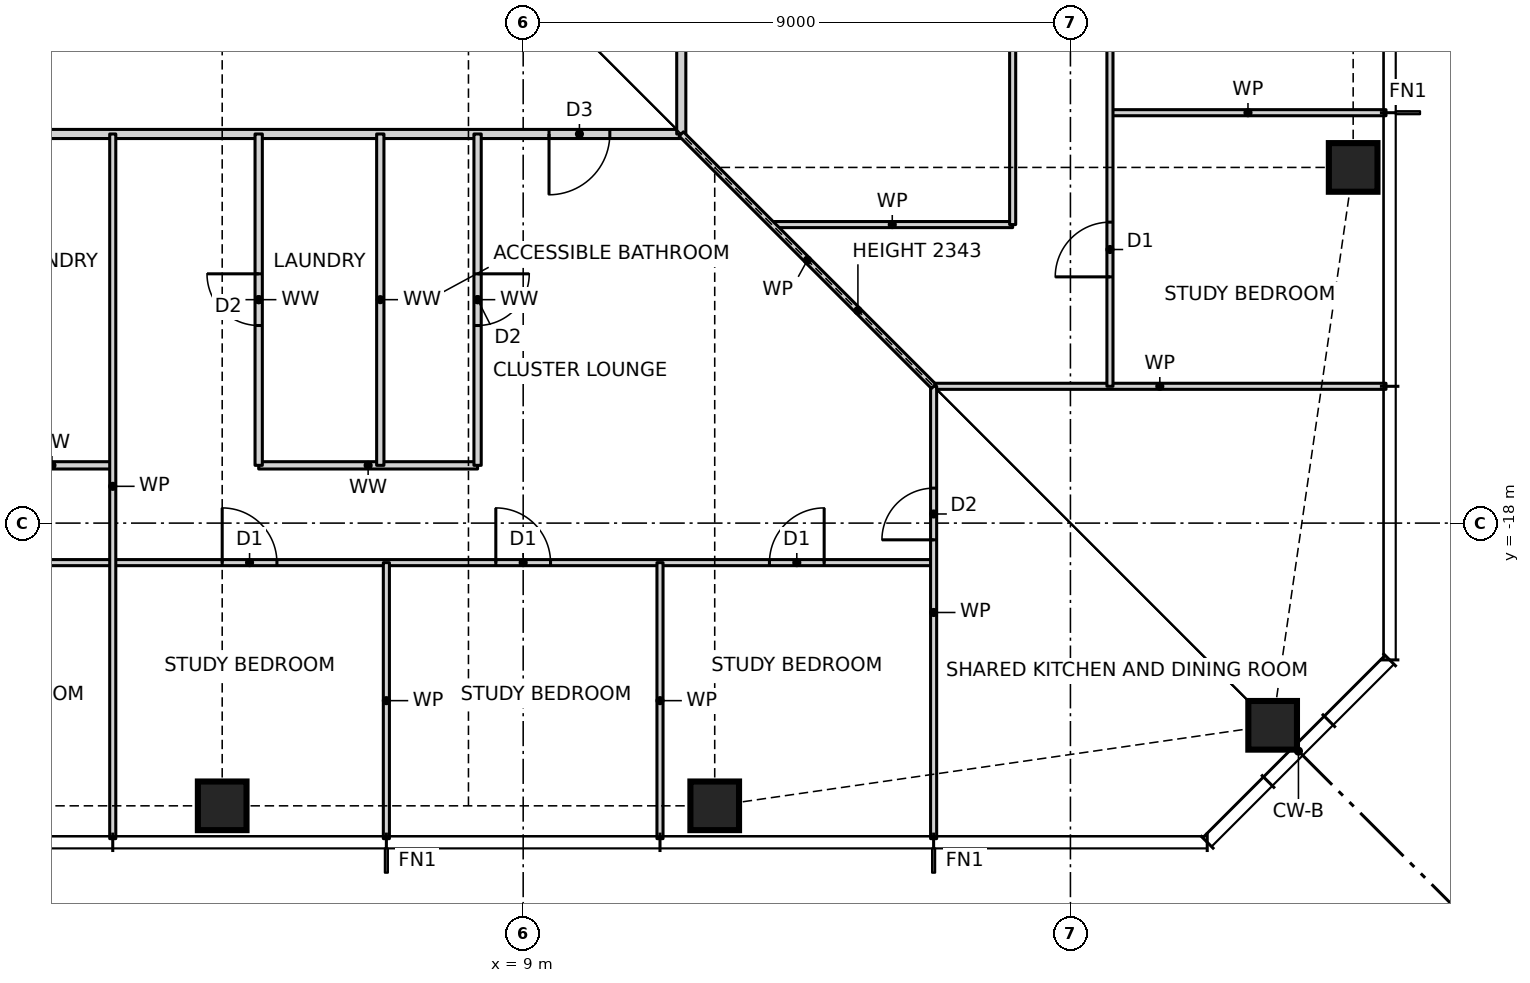
"""IFC4 building model, lengths in metres.
Left out: names, types, materials, properties, quantities, classifications, styles, units other than length and angle.
Written with IfcOpenShell. Run it as: python <this file> out.ifc"""

import sys

from ifc_helpers import new_model, si_unit, direction, frame, frame_2d, origin, origin_2d, place, context, subcontext, project, spatial, rectangle, hollow_rectangle, extrude, element, fill, save


model = new_model("IFC4")
c1 = context("Model", 3, precision=1e-05, world=origin(), true_north=direction((0.0, 1.0)))
c2 = subcontext(c1, "Body", "Model", "MODEL_VIEW")
j1 = project(units=[si_unit("LENGTHUNIT", "METRE"), si_unit("PLANEANGLEUNIT", "RADIAN")], contexts=[c1])
p1 = place(None, origin())
s1 = spatial("IfcSite", under=j1, at=p1, CompositionType="ELEMENT")
p2 = place(p1, origin())
s2 = spatial("IfcBuilding", under=s1, at=p2, CompositionType="ELEMENT")
p3 = place(p2, frame((0.0, 0.0, 53.5)))
s3 = spatial("IfcBuildingStorey", under=s2, at=p3, CompositionType="ELEMENT", Elevation=53.5)
for number, where, z_axis, x_axis in (
    (1, (4.05, -22.65, 0.0), (0.0, 0.0, 1.0), (1.0, 0.0, 0.0)),
    (2, (12.15, -22.65, 0.0), (0.0, 0.0, 1.0), (1.0, 0.0, 0.0)),
    (3, (21.326, -21.326, 0.0), (0.0, 0.0, 1.0), (1.0, 0.0, 0.0)),
    (4, (22.65, -12.15, 0.0), (0.0, 0.0, 1.0), (1.0, 0.0, 0.0)),
):
    element("IfcColumn", number, at=place(p3, frame(where, z_axis=z_axis, x_axis=x_axis)), inside=s3, PredefinedType="COLUMN", context=c2, shape_type="SweptSolid", body=[
        extrude(hollow_rectangle(XDim=0.8, YDim=0.8, WallThickness=0.09, at=origin_2d()), origin(), (0.0, 0.0, 1.0), 3.5),
    ])
p4 = place(p3, frame((-15.75, -18.65, 0.0), z_axis=(0.0, 0.0, 1.0), x_axis=(1.0, 0.0, 0.0)))
e5 = element("IfcWall", 5, at=p4, inside=s3, PredefinedType="PARTITIONING", context=c2, shape_type="SweptSolid", body=[
    extrude(rectangle(XDim=31.5, YDim=0.1, at=frame_2d((15.75, 0.0))), origin(), (0.0, 0.0, 1.0), 3.27),
])
p5 = place(p4, frame((1.8, 0.0, 0.0)))
e6 = element("IfcOpeningElement", 6, at=p5, cuts=e5, PredefinedType="OPENING", context=c2, shape_type="SweptSolid", body=[
    extrude(rectangle(XDim=0.9, YDim=2.1, at=frame_2d((0.45, 1.05))), frame((0.0, 0.06, 0.0), z_axis=(0.0, -1.0, 0.0), x_axis=(1.0, 0.0, 0.0)), (0.0, 0.0, 1.0), 0.12),
])
p6 = place(p4, frame((6.3, 0.0, 0.0)))
e7 = element("IfcOpeningElement", 7, at=p6, cuts=e5, PredefinedType="OPENING", context=c2, shape_type="SweptSolid", body=[
    extrude(rectangle(XDim=0.9, YDim=2.1, at=frame_2d((0.45, 1.05))), frame((0.0, 0.06, 0.0), z_axis=(0.0, -1.0, 0.0), x_axis=(1.0, 0.0, 0.0)), (0.0, 0.0, 1.0), 0.12),
])
p7 = place(p4, frame((10.8, 0.0, 0.0)))
e8 = element("IfcOpeningElement", 8, at=p7, cuts=e5, PredefinedType="OPENING", context=c2, shape_type="SweptSolid", body=[
    extrude(rectangle(XDim=0.9, YDim=2.1, at=frame_2d((0.45, 1.05))), frame((0.0, 0.06, 0.0), z_axis=(0.0, -1.0, 0.0), x_axis=(1.0, 0.0, 0.0)), (0.0, 0.0, 1.0), 0.12),
])
p8 = place(p4, frame((15.3, 0.0, 0.0)))
e9 = element("IfcOpeningElement", 9, at=p8, cuts=e5, PredefinedType="OPENING", context=c2, shape_type="SweptSolid", body=[
    extrude(rectangle(XDim=0.9, YDim=2.1, at=frame_2d((0.45, 1.05))), frame((0.0, 0.06, 0.0), z_axis=(0.0, -1.0, 0.0), x_axis=(1.0, 0.0, 0.0)), (0.0, 0.0, 1.0), 0.12),
])
p9 = place(p4, frame((19.8, 0.0, 0.0)))
e10 = element("IfcOpeningElement", 10, at=p9, cuts=e5, PredefinedType="OPENING", context=c2, shape_type="SweptSolid", body=[
    extrude(rectangle(XDim=0.9, YDim=2.1, at=frame_2d((0.45, 1.05))), frame((0.0, 0.06, 0.0), z_axis=(0.0, -1.0, 0.0), x_axis=(1.0, 0.0, 0.0)), (0.0, 0.0, 1.0), 0.12),
])
p10 = place(p4, frame((24.3, 0.0, 0.0)))
e11 = element("IfcOpeningElement", 11, at=p10, cuts=e5, PredefinedType="OPENING", context=c2, shape_type="SweptSolid", body=[
    extrude(rectangle(XDim=0.9, YDim=2.1, at=frame_2d((0.45, 1.05))), frame((0.0, 0.06, 0.0), z_axis=(0.0, -1.0, 0.0), x_axis=(1.0, 0.0, 0.0)), (0.0, 0.0, 1.0), 0.12),
])
p11 = place(p4, frame((28.8, 0.0, 0.0)))
e12 = element("IfcOpeningElement", 12, at=p11, cuts=e5, PredefinedType="OPENING", context=c2, shape_type="SweptSolid", body=[
    extrude(rectangle(XDim=0.9, YDim=2.1, at=frame_2d((0.45, 1.05))), frame((0.0, 0.06, 0.0), z_axis=(0.0, -1.0, 0.0), x_axis=(1.0, 0.0, 0.0)), (0.0, 0.0, 1.0), 0.12),
])
p12 = place(p3, frame((0.25, -17.05, 0.0), z_axis=(0.0, 0.0, 1.0), x_axis=(1.0, 0.0, 0.0)))
e13 = element("IfcWall", 13, at=p12, inside=s3, PredefinedType="PARTITIONING", context=c2, shape_type="SweptSolid", body=[
    extrude(rectangle(XDim=2.0, YDim=0.12, at=frame_2d((1.0, 0.0))), origin(), (0.0, 0.0, 1.0), 3.27),
])
p13 = place(p3, frame((4.65, -17.05, 0.0), z_axis=(0.0, 0.0, 1.0), x_axis=(1.0, 0.0, 0.0)))
e14 = element("IfcWall", 14, at=p13, inside=s3, PredefinedType="PARTITIONING", context=c2, shape_type="SweptSolid", body=[
    extrude(rectangle(XDim=3.6, YDim=0.12, at=frame_2d((1.8, 0.0))), origin(), (0.0, 0.0, 1.0), 3.27),
])
p14 = place(p3, frame((15.75, -15.75, 0.0), z_axis=(0.0, 0.0, 1.0), x_axis=(1.0, 0.0, 0.0)))
e15 = element("IfcWall", 15, at=p14, inside=s3, PredefinedType="PARTITIONING", context=c2, shape_type="SweptSolid", body=[
    extrude(rectangle(XDim=7.44, YDim=0.1, at=frame_2d((3.72, 0.0))), origin(), (0.0, 0.0, 1.0), 3.27),
])
p15 = place(p3, frame((13.09, -13.09, 0.0), z_axis=(0.0, 0.0, 1.0), x_axis=(1.0, 0.0, 0.0)))
e16 = element("IfcWall", 16, at=p15, inside=s3, PredefinedType="PARTITIONING", context=c2, shape_type="SweptSolid", body=[
    extrude(rectangle(XDim=3.96, YDim=0.1, at=frame_2d((1.98, 0.0))), origin(), (0.0, 0.0, 1.0), 3.27),
])
p16 = place(p3, frame((-12.6, -11.6, 0.0), z_axis=(0.0, 0.0, 1.0), x_axis=(1.0, 0.0, 0.0)))
e17 = element("IfcWall", 17, at=p16, inside=s3, PredefinedType="PARTITIONING", context=c2, shape_type="SweptSolid", body=[
    extrude(rectangle(XDim=24.2, YDim=0.15, at=frame_2d((12.1, 0.0))), origin(), (0.0, 0.0, 1.0), 3.27),
])
p17 = place(p16, frame((1.74, 0.0, 0.0)))
e18 = element("IfcOpeningElement", 18, at=p17, cuts=e17, PredefinedType="OPENING", context=c2, shape_type="SweptSolid", body=[
    extrude(rectangle(XDim=1.0, YDim=2.1, at=frame_2d((0.5, 1.05))), frame((0.0, 0.085, 0.0), z_axis=(0.0, -1.0, 0.0), x_axis=(1.0, 0.0, 0.0)), (0.0, 0.0, 1.0), 0.17),
])
p18 = place(p16, frame((22.025, 0.0, 0.0)))
e19 = element("IfcOpeningElement", 19, at=p18, cuts=e17, PredefinedType="OPENING", context=c2, shape_type="SweptSolid", body=[
    extrude(rectangle(XDim=1.0, YDim=2.1, at=frame_2d((0.5, 1.05))), frame((0.0, 0.085, 0.0), z_axis=(0.0, -1.0, 0.0), x_axis=(1.0, 0.0, 0.0)), (0.0, 0.0, 1.0), 0.17),
])
p19 = place(p3, frame((18.65, -11.25, 0.0), z_axis=(0.0, 0.0, 1.0), x_axis=(1.0, 0.0, 0.0)))
e20 = element("IfcWall", 20, at=p19, inside=s3, PredefinedType="PARTITIONING", context=c2, shape_type="SweptSolid", body=[
    extrude(rectangle(XDim=4.54, YDim=0.1, at=frame_2d((2.27, 0.0))), origin(), (0.0, 0.0, 1.0), 3.27),
])
p20 = place(p3, frame((18.65, -15.75, 0.0), z_axis=(0.0, 0.0, 1.0), x_axis=(0.0, 1.0, 0.0)))
e21 = element("IfcWall", 21, at=p20, inside=s3, PredefinedType="PARTITIONING", context=c2, shape_type="SweptSolid", body=[
    extrude(rectangle(XDim=31.5, YDim=0.1, at=frame_2d((15.75, 0.0))), origin(), (0.0, 0.0, 1.0), 3.27),
])
p21 = place(p20, frame((1.8, 0.0, 0.0)))
e22 = element("IfcOpeningElement", 22, at=p21, cuts=e21, PredefinedType="OPENING", context=c2, shape_type="SweptSolid", body=[
    extrude(rectangle(XDim=0.9, YDim=2.1, at=frame_2d((0.45, 1.05))), frame((0.0, 0.06, 0.0), z_axis=(0.0, -1.0, 0.0), x_axis=(1.0, 0.0, 0.0)), (0.0, 0.0, 1.0), 0.12),
])
p22 = place(p20, frame((6.3, 0.0, 0.0)))
e23 = element("IfcOpeningElement", 23, at=p22, cuts=e21, PredefinedType="OPENING", context=c2, shape_type="SweptSolid", body=[
    extrude(rectangle(XDim=0.9, YDim=2.1, at=frame_2d((0.45, 1.05))), frame((0.0, 0.06, 0.0), z_axis=(0.0, -1.0, 0.0), x_axis=(1.0, 0.0, 0.0)), (0.0, 0.0, 1.0), 0.12),
])
p23 = place(p20, frame((10.8, 0.0, 0.0)))
e24 = element("IfcOpeningElement", 24, at=p23, cuts=e21, PredefinedType="OPENING", context=c2, shape_type="SweptSolid", body=[
    extrude(rectangle(XDim=0.9, YDim=2.1, at=frame_2d((0.45, 1.05))), frame((0.0, 0.06, 0.0), z_axis=(0.0, -1.0, 0.0), x_axis=(1.0, 0.0, 0.0)), (0.0, 0.0, 1.0), 0.12),
])
p24 = place(p20, frame((15.3, 0.0, 0.0)))
e25 = element("IfcOpeningElement", 25, at=p24, cuts=e21, PredefinedType="OPENING", context=c2, shape_type="SweptSolid", body=[
    extrude(rectangle(XDim=0.9, YDim=2.1, at=frame_2d((0.45, 1.05))), frame((0.0, 0.06, 0.0), z_axis=(0.0, -1.0, 0.0), x_axis=(1.0, 0.0, 0.0)), (0.0, 0.0, 1.0), 0.12),
])
p25 = place(p20, frame((19.8, 0.0, 0.0)))
e26 = element("IfcOpeningElement", 26, at=p25, cuts=e21, PredefinedType="OPENING", context=c2, shape_type="SweptSolid", body=[
    extrude(rectangle(XDim=0.9, YDim=2.1, at=frame_2d((0.45, 1.05))), frame((0.0, 0.06, 0.0), z_axis=(0.0, -1.0, 0.0), x_axis=(1.0, 0.0, 0.0)), (0.0, 0.0, 1.0), 0.12),
])
p26 = place(p20, frame((24.3, 0.0, 0.0)))
e27 = element("IfcOpeningElement", 27, at=p26, cuts=e21, PredefinedType="OPENING", context=c2, shape_type="SweptSolid", body=[
    extrude(rectangle(XDim=0.9, YDim=2.1, at=frame_2d((0.45, 1.05))), frame((0.0, 0.06, 0.0), z_axis=(0.0, -1.0, 0.0), x_axis=(1.0, 0.0, 0.0)), (0.0, 0.0, 1.0), 0.12),
])
p27 = place(p20, frame((28.8, 0.0, 0.0)))
e28 = element("IfcOpeningElement", 28, at=p27, cuts=e21, PredefinedType="OPENING", context=c2, shape_type="SweptSolid", body=[
    extrude(rectangle(XDim=0.9, YDim=2.1, at=frame_2d((0.45, 1.05))), frame((0.0, 0.06, 0.0), z_axis=(0.0, -1.0, 0.0), x_axis=(1.0, 0.0, 0.0)), (0.0, 0.0, 1.0), 0.12),
])
p28 = place(p3, frame((17.05, -13.09, 0.0), z_axis=(0.0, 0.0, 1.0), x_axis=(0.0, 1.0, 0.0)))
e29 = element("IfcWall", 29, at=p28, inside=s3, PredefinedType="PARTITIONING", context=c2, shape_type="SweptSolid", body=[
    extrude(rectangle(XDim=21.34, YDim=0.1, at=frame_2d((10.67, 0.0))), origin(), (0.0, 0.0, 1.0), 3.27),
])
p29 = place(p28, frame((4.91, 0.0, 0.0)))
e30 = element("IfcOpeningElement", 30, at=p29, cuts=e29, PredefinedType="OPENING", context=c2, shape_type="SweptSolid", body=[
    extrude(rectangle(XDim=0.85, YDim=2.1, at=frame_2d((0.425, 1.05))), frame((0.0, 0.06, 0.0), z_axis=(0.0, -1.0, 0.0), x_axis=(1.0, 0.0, 0.0)), (0.0, 0.0, 1.0), 0.12),
])
p30 = place(p28, frame((15.58, 0.0, 0.0)))
e31 = element("IfcOpeningElement", 31, at=p30, cuts=e29, PredefinedType="OPENING", context=c2, shape_type="SweptSolid", body=[
    extrude(rectangle(XDim=0.85, YDim=2.1, at=frame_2d((0.425, 1.05))), frame((0.0, 0.06, 0.0), z_axis=(0.0, -1.0, 0.0), x_axis=(1.0, 0.0, 0.0)), (0.0, 0.0, 1.0), 0.12),
])
p31 = place(p3, frame((15.75, -23.19, 0.0), z_axis=(0.0, 0.0, 1.0), x_axis=(0.0, 1.0, 0.0)))
e32 = element("IfcWall", 32, at=p31, inside=s3, PredefinedType="PARTITIONING", context=c2, shape_type="SweptSolid", body=[
    extrude(rectangle(XDim=7.44, YDim=0.1, at=frame_2d((3.72, 0.0))), origin(), (0.0, 0.0, 1.0), 3.27),
])
p32 = place(p31, frame((4.915, 0.0, 0.0)))
e33 = element("IfcOpeningElement", 33, at=p32, cuts=e32, PredefinedType="OPENING", context=c2, shape_type="SweptSolid", body=[
    extrude(rectangle(XDim=0.85, YDim=2.1, at=frame_2d((0.425, 1.05))), frame((0.0, 0.06, 0.0), z_axis=(0.0, -1.0, 0.0), x_axis=(1.0, 0.0, 0.0)), (0.0, 0.0, 1.0), 0.12),
])
p33 = place(p3, frame((11.6, -11.6, 0.0), z_axis=(0.0, 0.0, 1.0), x_axis=(0.0, 1.0, 0.0)))
e34 = element("IfcWall", 34, at=p33, inside=s3, PredefinedType="PARTITIONING", context=c2, shape_type="SweptSolid", body=[
    extrude(rectangle(XDim=23.2, YDim=0.15, at=frame_2d((11.6, 0.0))), origin(), (0.0, 0.0, 1.0), 3.27),
])
p34 = place(p33, frame((20.55, 0.0, 0.0)))
e35 = element("IfcOpeningElement", 35, at=p34, cuts=e34, PredefinedType="OPENING", context=c2, shape_type="SweptSolid", body=[
    extrude(rectangle(XDim=1.0, YDim=2.1, at=frame_2d((0.5, 1.05))), frame((0.0, 0.085, 0.0), z_axis=(0.0, -1.0, 0.0), x_axis=(1.0, 0.0, 0.0)), (0.0, 0.0, 1.0), 0.17),
])
p35 = place(p3, frame((11.25, -23.19, 0.0), z_axis=(0.0, 0.0, 1.0), x_axis=(0.0, 1.0, 0.0)))
e36 = element("IfcWall", 36, at=p35, inside=s3, PredefinedType="PARTITIONING", context=c2, shape_type="SweptSolid", body=[
    extrude(rectangle(XDim=4.54, YDim=0.1, at=frame_2d((2.27, 0.0))), origin(), (0.0, 0.0, 1.0), 3.27),
])
p36 = place(p3, frame((8.25, -17.05, 0.0), z_axis=(0.0, 0.0, 1.0), x_axis=(0.0, 1.0, 0.0)))
e37 = element("IfcWall", 37, at=p36, inside=s3, PredefinedType="PARTITIONING", context=c2, shape_type="SweptSolid", body=[
    extrude(rectangle(XDim=5.45, YDim=0.12, at=frame_2d((2.725, 0.0))), origin(), (0.0, 0.0, 1.0), 3.27),
])
p37 = place(p36, frame((2.3, 0.0, 0.0)))
e38 = element("IfcOpeningElement", 38, at=p37, cuts=e37, PredefinedType="OPENING", context=c2, shape_type="SweptSolid", body=[
    extrude(rectangle(XDim=0.85, YDim=2.1, at=frame_2d((0.425, 1.05))), frame((0.0, 0.07, 0.0), z_axis=(0.0, -1.0, 0.0), x_axis=(1.0, 0.0, 0.0)), (0.0, 0.0, 1.0), 0.14),
])
p38 = place(p3, frame((6.75, -23.19, 0.0), z_axis=(0.0, 0.0, 1.0), x_axis=(0.0, 1.0, 0.0)))
e39 = element("IfcWall", 39, at=p38, inside=s3, PredefinedType="PARTITIONING", context=c2, shape_type="SweptSolid", body=[
    extrude(rectangle(XDim=4.54, YDim=0.1, at=frame_2d((2.27, 0.0))), origin(), (0.0, 0.0, 1.0), 3.27),
])
p39 = place(p3, frame((6.65, -17.05, 0.0), z_axis=(0.0, 0.0, 1.0), x_axis=(0.0, 1.0, 0.0)))
e40 = element("IfcWall", 40, at=p39, inside=s3, PredefinedType="PARTITIONING", context=c2, shape_type="SweptSolid", body=[
    extrude(rectangle(XDim=5.45, YDim=0.12, at=frame_2d((2.725, 0.0))), origin(), (0.0, 0.0, 1.0), 3.27),
])
p40 = place(p3, frame((4.65, -17.05, 0.0), z_axis=(0.0, 0.0, 1.0), x_axis=(0.0, 1.0, 0.0)))
e41 = element("IfcWall", 41, at=p40, inside=s3, PredefinedType="PARTITIONING", context=c2, shape_type="SweptSolid", body=[
    extrude(rectangle(XDim=5.45, YDim=0.12, at=frame_2d((2.725, 0.0))), origin(), (0.0, 0.0, 1.0), 3.27),
])
p41 = place(p40, frame((2.3, 0.0, 0.0)))
e42 = element("IfcOpeningElement", 42, at=p41, cuts=e41, PredefinedType="OPENING", context=c2, shape_type="SweptSolid", body=[
    extrude(rectangle(XDim=0.85, YDim=2.1, at=frame_2d((0.425, 1.05))), frame((0.0, 0.07, 0.0), z_axis=(0.0, -1.0, 0.0), x_axis=(1.0, 0.0, 0.0)), (0.0, 0.0, 1.0), 0.14),
])
p42 = place(p3, frame((2.25, -23.19, 0.0), z_axis=(0.0, 0.0, 1.0), x_axis=(0.0, 1.0, 0.0)))
e43 = element("IfcWall", 43, at=p42, inside=s3, PredefinedType="PARTITIONING", context=c2, shape_type="SweptSolid", body=[
    extrude(rectangle(XDim=11.59, YDim=0.1, at=frame_2d((5.795, 0.0))), origin(), (0.0, 0.0, 1.0), 3.27),
])
p43 = place(p3, frame((15.75, -15.75, 0.0), z_axis=(0.0, 0.0, 1.0), x_axis=(-0.707106781187, 0.707106781187, 0.0)))
e44 = element("IfcWall", 44, at=p43, inside=s3, PredefinedType="PARTITIONING", context=c2, shape_type="SweptSolid", body=[
    extrude(rectangle(XDim=5.869, YDim=0.1, at=frame_2d((2.935, 0.0))), origin(), (0.0, 0.0, 1.0), 2.343),
])
p44 = place(p9, origin())
e45 = element("IfcDoor", 45, at=p44, inside=s3, OperationType="SINGLE_SWING_LEFT", PredefinedType="DOOR", context=c2, shape_type="SweptSolid", body=[
    extrude(rectangle(XDim=0.9, YDim=2.1, at=frame_2d((0.45, 1.05))), frame((0.0, 0.025, 0.0), z_axis=(0.0, -1.0, 0.0), x_axis=(1.0, 0.0, 0.0)), (0.0, 0.0, 1.0), 0.05),
])
fill(e10, e45)
p45 = place(p10, origin())
e46 = element("IfcDoor", 46, at=p45, inside=s3, OperationType="SINGLE_SWING_LEFT", PredefinedType="DOOR", context=c2, shape_type="SweptSolid", body=[
    extrude(rectangle(XDim=0.9, YDim=2.1, at=frame_2d((0.45, 1.05))), frame((0.0, 0.025, 0.0), z_axis=(0.0, -1.0, 0.0), x_axis=(1.0, 0.0, 0.0)), (0.0, 0.0, 1.0), 0.05),
])
fill(e11, e46)
p46 = place(p11, origin())
e47 = element("IfcDoor", 47, at=p46, inside=s3, OperationType="SINGLE_SWING_RIGHT", PredefinedType="DOOR", context=c2, shape_type="SweptSolid", body=[
    extrude(rectangle(XDim=0.9, YDim=2.1, at=frame_2d((0.45, 1.05))), frame((0.0, 0.025, 0.0), z_axis=(0.0, -1.0, 0.0), x_axis=(1.0, 0.0, 0.0)), (0.0, 0.0, 1.0), 0.05),
])
fill(e12, e47)
p47 = place(p18, frame((1.0, 0.0, 0.0), z_axis=(0.0, 0.0, 1.0), x_axis=(-1.0, 0.0, 0.0)))
e48 = element("IfcDoor", 48, at=p47, inside=s3, OperationType="SINGLE_SWING_RIGHT", PredefinedType="DOOR", context=c2, shape_type="SweptSolid", body=[
    extrude(rectangle(XDim=1.0, YDim=2.1, at=frame_2d((0.5, 1.05))), frame((0.0, 0.025, 0.0), z_axis=(0.0, -1.0, 0.0), x_axis=(1.0, 0.0, 0.0)), (0.0, 0.0, 1.0), 0.05),
])
fill(e19, e48)
p48 = place(p41, origin())
e49 = element("IfcDoor", 49, at=p48, inside=s3, OperationType="SINGLE_SWING_RIGHT", PredefinedType="DOOR", context=c2, shape_type="SweptSolid", body=[
    extrude(rectangle(XDim=0.85, YDim=2.1, at=frame_2d((0.425, 1.05))), frame((0.0, 0.025, 0.0), z_axis=(0.0, -1.0, 0.0), x_axis=(1.0, 0.0, 0.0)), (0.0, 0.0, 1.0), 0.05),
])
fill(e42, e49)
p49 = place(p37, frame((0.85, 0.0, 0.0), z_axis=(0.0, 0.0, 1.0), x_axis=(-1.0, 0.0, 0.0)))
e50 = element("IfcDoor", 50, at=p49, inside=s3, OperationType="SINGLE_SWING_LEFT", PredefinedType="DOOR", context=c2, shape_type="SweptSolid", body=[
    extrude(rectangle(XDim=0.85, YDim=2.1, at=frame_2d((0.425, 1.05))), frame((0.0, 0.025, 0.0), z_axis=(0.0, -1.0, 0.0), x_axis=(1.0, 0.0, 0.0)), (0.0, 0.0, 1.0), 0.05),
])
fill(e38, e50)
p50 = place(p21, origin())
e51 = element("IfcDoor", 51, at=p50, inside=s3, OperationType="SINGLE_SWING_LEFT", PredefinedType="DOOR", context=c2, shape_type="SweptSolid", body=[
    extrude(rectangle(XDim=0.9, YDim=2.1, at=frame_2d((0.45, 1.05))), frame((0.0, 0.025, 0.0), z_axis=(0.0, -1.0, 0.0), x_axis=(1.0, 0.0, 0.0)), (0.0, 0.0, 1.0), 0.05),
])
fill(e22, e51)
p51 = place(p32, origin())
e52 = element("IfcDoor", 52, at=p51, inside=s3, OperationType="SINGLE_SWING_LEFT", PredefinedType="DOOR", context=c2, shape_type="SweptSolid", body=[
    extrude(rectangle(XDim=0.85, YDim=2.1, at=frame_2d((0.425, 1.05))), frame((0.0, 0.025, 0.0), z_axis=(0.0, -1.0, 0.0), x_axis=(1.0, 0.0, 0.0)), (0.0, 0.0, 1.0), 0.05),
])
fill(e33, e52)
save(model, sys.argv[1])
